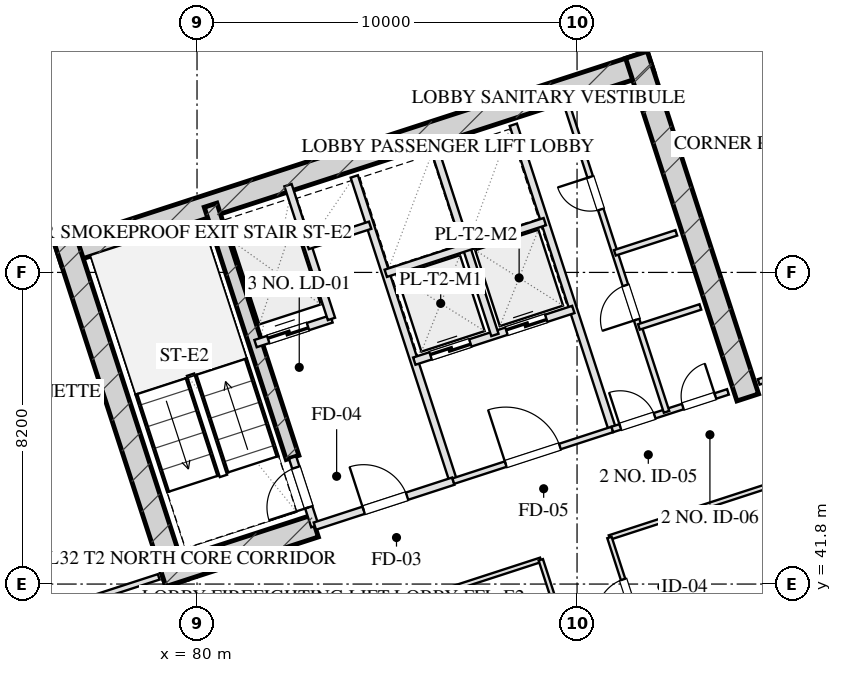
"""IFC4 building model, lengths in metres.
Left out: names, types, materials, properties, quantities, classifications, styles, units other than length and angle.
Written with IfcOpenShell. Run it as: python <this file> out.ifc"""

import sys

from ifc_helpers import new_model, si_unit, direction, frame, frame_2d, origin, place, context, subcontext, project, spatial, rectangle, extrude, element, fill, save


model = new_model("IFC4")
c1 = context("Model", 3, precision=1e-05, world=origin(), true_north=direction((0.0, 1.0)))
c2 = subcontext(c1, "Body", "Model", "MODEL_VIEW")
j1 = project(units=[si_unit("LENGTHUNIT", "METRE"), si_unit("PLANEANGLEUNIT", "RADIAN")], contexts=[c1])
p1 = place(None, origin())
s1 = spatial("IfcSite", under=j1, at=p1, CompositionType="ELEMENT")
p2 = place(p1, origin())
s2 = spatial("IfcBuilding", under=s1, at=p2, CompositionType="ELEMENT")
p3 = place(p2, frame((0.0, 0.0, 124.2)))
s3 = spatial("IfcBuildingStorey", under=s2, at=p3, CompositionType="ELEMENT", Elevation=124.2)
p4 = place(p3, frame((76.344, 50.466, 0.0), z_axis=(0.0, 0.0, 1.0), x_axis=(0.951055727519, 0.309019421968, 0.0)))
e1 = element("IfcWall", 1, at=p4, inside=s3, PredefinedType="SHEAR", context=c2, shape_type="SweptSolid", body=[
    extrude(rectangle(XDim=16.4, YDim=0.6, at=frame_2d((8.2, 0.0))), origin(), (0.0, 0.0, 1.0), 3.45),
])
for number, where, z_axis, x_axis in (
    (2, (79.466, 41.828, 0.0), (0.0, 0.0, 1.0), (-0.309, 0.951, 0.0)),
    (3, (94.492, 46.71, 0.0), (0.0, 0.0, 1.0), (-0.309, 0.951, 0.0)),
):
    element("IfcWall", number, at=place(p3, frame(where, z_axis=z_axis, x_axis=x_axis)), inside=s3, PredefinedType="SHEAR", context=c2, shape_type="SweptSolid", body=[
        extrude(rectangle(XDim=9.48, YDim=0.6, at=frame_2d((4.74, 0.0))), origin(), (0.0, 0.0, 1.0), 3.45),
    ])
p5 = place(p3, frame((82.514, 45.131, 0.0), z_axis=(0.0, 0.0, 1.0), x_axis=(-0.308988790936, 0.951065679686, 0.0)))
e4 = element("IfcWall", 4, at=p5, inside=s3, PredefinedType="SHEAR", context=c2, shape_type="SweptSolid", body=[
    extrude(rectangle(XDim=6.98, YDim=0.35, at=frame_2d((3.49, 0.0))), origin(), (0.0, 0.0, 1.0), 3.45),
])
p6 = place(p3, frame((79.087, 42.021, 0.0), z_axis=(0.0, 0.0, 1.0), x_axis=(0.951062550203, 0.3089984233, 0.0)))
e5 = element("IfcWall", 5, at=p6, inside=s3, PredefinedType="SHEAR", context=c2, shape_type="SweptSolid", body=[
    extrude(rectangle(XDim=4.22, YDim=0.6, at=frame_2d((2.11, 0.0))), origin(), (0.0, 0.0, 1.0), 3.45),
])
p7 = place(p3, frame((80.716, 6.59, 0.0), z_axis=(0.0, 0.0, 1.0), x_axis=(-0.309017542002, 0.95105633836, 0.0)))
e6 = element("IfcWall", 6, at=p7, inside=s3, PredefinedType="SOLIDWALL", context=c2, shape_type="SweptSolid", body=[
    extrude(rectangle(XDim=46.4, YDim=0.4, at=frame_2d((23.2, 0.0))), origin(), (0.0, 0.0, 1.0), 2.61),
])
p8 = place(p7, frame((28.4, 0.0, 0.75)))
e7 = element("IfcOpeningElement", 7, at=p8, cuts=e6, PredefinedType="OPENING", context=c2, shape_type="SweptSolid", body=[
    extrude(rectangle(XDim=2.4, YDim=1.46, at=frame_2d((1.2, 0.73))), frame((0.0, 0.21, 0.0), z_axis=(0.0, -1.0, 0.0), x_axis=(1.0, 0.0, 0.0)), (0.0, 0.0, 1.0), 0.42),
])
p9 = place(p7, frame((18.25, 0.0, 0.0)))
e8 = element("IfcOpeningElement", 8, at=p9, cuts=e6, PredefinedType="OPENING", context=c2, shape_type="SweptSolid", body=[
    extrude(rectangle(XDim=1.1, YDim=2.15, at=frame_2d((0.55, 1.075))), frame((0.0, 0.21, 0.0), z_axis=(0.0, -1.0, 0.0), x_axis=(1.0, 0.0, 0.0)), (0.0, 0.0, 1.0), 0.42),
])
p10 = place(p3, frame((68.047, 53.995, 0.0), z_axis=(0.0, 0.0, 1.0), x_axis=(0.95105505922, 0.309021478754, 0.0)))
e9 = element("IfcWall", 9, at=p10, inside=s3, PredefinedType="SOLIDWALL", context=c2, shape_type="SweptSolid", body=[
    extrude(rectangle(XDim=29.4, YDim=0.4, at=frame_2d((14.7, 0.0))), origin(), (0.0, 0.0, 1.0), 2.61),
])
p11 = place(p3, frame((83.101, 43.324, 0.0), z_axis=(0.0, 0.0, 1.0), x_axis=(-0.309048298632, 0.951046344356, 0.0)))
e10 = element("IfcWall", 10, at=p11, inside=s3, PredefinedType="PARTITIONING", context=c2, shape_type="SweptSolid", body=[
    extrude(rectangle(XDim=1.9, YDim=0.2, at=frame_2d((0.95, 0.0))), origin(), (0.0, 0.0, 1.0), 3.175),
])
p12 = place(p11, frame((0.52, 0.0, 0.0)))
e11 = element("IfcOpeningElement", 11, at=p12, cuts=e10, PredefinedType="OPENING", context=c2, shape_type="SweptSolid", body=[
    extrude(rectangle(XDim=1.1, YDim=2.05, at=frame_2d((0.55, 1.025))), frame((0.0, 0.11, 0.0), z_axis=(0.0, -1.0, 0.0), x_axis=(1.0, 0.0, 0.0)), (0.0, 0.0, 1.0), 0.22),
])
p13 = place(p3, frame((86.743, 44.508, 0.0), z_axis=(0.0, 0.0, 1.0), x_axis=(-0.309016001439, 0.951056838919, 0.0)))
e12 = element("IfcWall", 12, at=p13, inside=s3, PredefinedType="PARTITIONING", context=c2, shape_type="SweptSolid", body=[
    extrude(rectangle(XDim=8.43, YDim=0.2, at=frame_2d((4.215, 0.0))), origin(), (0.0, 0.0, 1.0), 3.175),
])
p14 = place(p3, frame((83.101, 43.324, 0.0), z_axis=(0.0, 0.0, 1.0), x_axis=(0.951052804469, 0.309028417967, 0.0)))
e13 = element("IfcWall", 13, at=p14, inside=s3, PredefinedType="PARTITIONING", context=c2, shape_type="SweptSolid", body=[
    extrude(rectangle(XDim=3.83, YDim=0.2, at=frame_2d((1.915, 0.0))), origin(), (0.0, 0.0, 1.0), 3.175),
])
p15 = place(p14, frame((1.35, 0.0, 0.0)))
e14 = element("IfcOpeningElement", 14, at=p15, cuts=e13, PredefinedType="OPENING", context=c2, shape_type="SweptSolid", body=[
    extrude(rectangle(XDim=1.2, YDim=2.05, at=frame_2d((0.6, 1.025))), frame((0.0, 0.11, 0.0), z_axis=(0.0, -1.0, 0.0), x_axis=(1.0, 0.0, 0.0)), (0.0, 0.0, 1.0), 0.22),
])
p16 = place(p3, frame((81.54, 48.127, 0.0), z_axis=(0.0, 0.0, 1.0), x_axis=(0.951062257173, 0.308999325213, 0.0)))
e15 = element("IfcWall", 15, at=p16, inside=s3, PredefinedType="PARTITIONING", context=c2, shape_type="SweptSolid", body=[
    extrude(rectangle(XDim=2.1, YDim=0.2, at=frame_2d((1.05, 0.0))), origin(), (0.0, 0.0, 1.0), 3.175),
])
p17 = place(p16, frame((0.35, 0.0, 0.0)))
e16 = element("IfcOpeningElement", 16, at=p17, cuts=e15, PredefinedType="OPENING", context=c2, shape_type="SweptSolid", body=[
    extrude(rectangle(XDim=1.1, YDim=2.05, at=frame_2d((0.55, 1.025))), frame((0.0, 0.11, 0.0), z_axis=(0.0, -1.0, 0.0), x_axis=(1.0, 0.0, 0.0)), (0.0, 0.0, 1.0), 0.22),
])
p18 = place(p3, frame((83.538, 48.776, 0.0), z_axis=(0.0, 0.0, 1.0), x_axis=(-0.3089935693, 0.951064127245, 0.0)))
e17 = element("IfcWall", 17, at=p18, inside=s3, PredefinedType="PARTITIONING", context=c2, shape_type="SweptSolid", body=[
    extrude(rectangle(XDim=3.7, YDim=0.2, at=frame_2d((1.85, 0.0))), origin(), (0.0, 0.0, 1.0), 3.175),
])
p19 = place(p3, frame((82.91, 50.707, 0.0), z_axis=(0.0, 0.0, 1.0), x_axis=(0.951041328149, 0.309063734775, 0.0)))
e18 = element("IfcWall", 18, at=p19, inside=s3, PredefinedType="PARTITIONING", context=c2, shape_type="SweptSolid", body=[
    extrude(rectangle(XDim=1.73, YDim=0.2, at=frame_2d((0.865, 0.0))), origin(), (0.0, 0.0, 1.0), 3.175),
])
p20 = place(p3, frame((90.928, 45.868, 0.0), z_axis=(0.0, 0.0, 1.0), x_axis=(-0.309042196757, 0.951048327176, 0.0)))
e19 = element("IfcWall", 19, at=p20, inside=s3, PredefinedType="PARTITIONING", context=c2, shape_type="SweptSolid", body=[
    extrude(rectangle(XDim=8.43, YDim=0.2, at=frame_2d((4.215, 0.0))), origin(), (0.0, 0.0, 1.0), 3.175),
])
p21 = place(p3, frame((86.743, 44.508, 0.0), z_axis=(0.0, 0.0, 1.0), x_axis=(0.951063829732, 0.308994485023, 0.0)))
e20 = element("IfcWall", 20, at=p21, inside=s3, PredefinedType="PARTITIONING", context=c2, shape_type="SweptSolid", body=[
    extrude(rectangle(XDim=4.4, YDim=0.15, at=frame_2d((2.2, 0.0))), origin(), (0.0, 0.0, 1.0), 3.175),
])
p22 = place(p21, frame((1.45, 0.0, 0.0)))
e21 = element("IfcOpeningElement", 21, at=p22, cuts=e20, PredefinedType="OPENING", context=c2, shape_type="SweptSolid", body=[
    extrude(rectangle(XDim=1.5, YDim=2.05, at=frame_2d((0.75, 1.025))), frame((0.0, 0.085, 0.0), z_axis=(0.0, -1.0, 0.0), x_axis=(1.0, 0.0, 0.0)), (0.0, 0.0, 1.0), 0.17),
])
p23 = place(p3, frame((85.718, 47.666, 0.0), z_axis=(0.0, 0.0, 1.0), x_axis=(0.951058531764, 0.30901079133, 0.0)))
e22 = element("IfcWall", 22, at=p23, inside=s3, PredefinedType="PARTITIONING", context=c2, shape_type="SweptSolid", body=[
    extrude(rectangle(XDim=4.4, YDim=0.2, at=frame_2d((2.2, 0.0))), origin(), (0.0, 0.0, 1.0), 3.175),
])
p24 = place(p23, frame((0.45, 0.0, 0.0)))
e23 = element("IfcOpeningElement", 23, at=p24, cuts=e22, PredefinedType="OPENING", context=c2, shape_type="SweptSolid", body=[
    extrude(rectangle(XDim=1.1, YDim=2.05, at=frame_2d((0.55, 1.025))), frame((0.0, 0.11, 0.0), z_axis=(0.0, -1.0, 0.0), x_axis=(1.0, 0.0, 0.0)), (0.0, 0.0, 1.0), 0.22),
])
p25 = place(p23, frame((2.55, 0.0, 0.0)))
e24 = element("IfcOpeningElement", 24, at=p25, cuts=e22, PredefinedType="OPENING", context=c2, shape_type="SweptSolid", body=[
    extrude(rectangle(XDim=1.1, YDim=2.05, at=frame_2d((0.55, 1.025))), frame((0.0, 0.11, 0.0), z_axis=(0.0, -1.0, 0.0), x_axis=(1.0, 0.0, 0.0)), (0.0, 0.0, 1.0), 0.22),
])
p26 = place(p3, frame((87.838, 48.354, 0.0), z_axis=(0.0, 0.0, 1.0), x_axis=(-0.3090093719, 0.951058992953, 0.0)))
e25 = element("IfcWall", 25, at=p26, inside=s3, PredefinedType="PARTITIONING", context=c2, shape_type="SweptSolid", body=[
    extrude(rectangle(XDim=5.11, YDim=0.2, at=frame_2d((2.555, 0.0))), origin(), (0.0, 0.0, 1.0), 3.175),
])
p27 = place(p3, frame((84.967, 49.977, 0.0), z_axis=(0.0, 0.0, 1.0), x_axis=(0.951063829732, 0.308994485023, 0.0)))
e26 = element("IfcWall", 26, at=p27, inside=s3, PredefinedType="PARTITIONING", context=c2, shape_type="SweptSolid", body=[
    extrude(rectangle(XDim=4.4, YDim=0.2, at=frame_2d((2.2, 0.0))), origin(), (0.0, 0.0, 1.0), 3.175),
])
p28 = place(p3, frame((90.928, 45.868, 0.0), z_axis=(0.0, 0.0, 1.0), x_axis=(0.951059297078, 0.309008435874, 0.0)))
e27 = element("IfcWall", 27, at=p28, inside=s3, PredefinedType="PARTITIONING", context=c2, shape_type="SweptSolid", body=[
    extrude(rectangle(XDim=3.2, YDim=0.15, at=frame_2d((1.6, 0.0))), origin(), (0.0, 0.0, 1.0), 3.175),
])
p29 = place(p28, frame((0.22, 0.0, 0.0)))
e28 = element("IfcOpeningElement", 28, at=p29, cuts=e27, PredefinedType="OPENING", context=c2, shape_type="SweptSolid", body=[
    extrude(rectangle(XDim=0.95, YDim=2.05, at=frame_2d((0.475, 1.025))), frame((0.0, 0.085, 0.0), z_axis=(0.0, -1.0, 0.0), x_axis=(1.0, 0.0, 0.0)), (0.0, 0.0, 1.0), 0.17),
])
p30 = place(p28, frame((1.95, 0.0, 0.0)))
e29 = element("IfcOpeningElement", 29, at=p30, cuts=e27, PredefinedType="OPENING", context=c2, shape_type="SweptSolid", body=[
    extrude(rectangle(XDim=0.9, YDim=2.05, at=frame_2d((0.45, 1.025))), frame((0.0, 0.085, 0.0), z_axis=(0.0, -1.0, 0.0), x_axis=(1.0, 0.0, 0.0)), (0.0, 0.0, 1.0), 0.17),
])
p31 = place(p3, frame((92.355, 46.331, 0.0), z_axis=(0.0, 0.0, 1.0), x_axis=(-0.309007490203, 0.951059604335, 0.0)))
e30 = element("IfcWall", 30, at=p31, inside=s3, PredefinedType="PARTITIONING", context=c2, shape_type="SweptSolid", body=[
    extrude(rectangle(XDim=8.43, YDim=0.15, at=frame_2d((4.215, 0.0))), origin(), (0.0, 0.0, 1.0), 3.175),
])
p32 = place(p31, frame((2.55, 0.0, 0.0)))
e31 = element("IfcOpeningElement", 31, at=p32, cuts=e30, PredefinedType="OPENING", context=c2, shape_type="SweptSolid", body=[
    extrude(rectangle(XDim=0.95, YDim=2.05, at=frame_2d((0.475, 1.025))), frame((0.0, 0.085, 0.0), z_axis=(0.0, -1.0, 0.0), x_axis=(1.0, 0.0, 0.0)), (0.0, 0.0, 1.0), 0.17),
])
p33 = place(p31, frame((5.6, 0.0, 0.0)))
e32 = element("IfcOpeningElement", 32, at=p33, cuts=e30, PredefinedType="OPENING", context=c2, shape_type="SweptSolid", body=[
    extrude(rectangle(XDim=0.9, YDim=2.05, at=frame_2d((0.45, 1.025))), frame((0.0, 0.085, 0.0), z_axis=(0.0, -1.0, 0.0), x_axis=(1.0, 0.0, 0.0)), (0.0, 0.0, 1.0), 0.17),
])
p34 = place(p3, frame((90.995, 50.516, 0.0), z_axis=(0.0, 0.0, 1.0), x_axis=(0.951040401051, 0.309066587596, 0.0)))
e33 = element("IfcWall", 33, at=p34, inside=s3, PredefinedType="PARTITIONING", context=c2, shape_type="SweptSolid", body=[
    extrude(rectangle(XDim=1.7, YDim=0.15, at=frame_2d((0.85, 0.0))), origin(), (0.0, 0.0, 1.0), 3.175),
])
p35 = place(p3, frame((91.628, 48.566, 0.0), z_axis=(0.0, 0.0, 1.0), x_axis=(0.951054116971, 0.309024378638, 0.0)))
e34 = element("IfcWall", 34, at=p35, inside=s3, PredefinedType="PARTITIONING", context=c2, shape_type="SweptSolid", body=[
    extrude(rectangle(XDim=1.7, YDim=0.15, at=frame_2d((0.85, 0.0))), origin(), (0.0, 0.0, 1.0), 3.175),
])
p36 = place(p3, frame((70.338, 39.177, 0.0), z_axis=(0.0, 0.0, 1.0), x_axis=(0.951059695568, 0.309007209409, 0.0)))
e35 = element("IfcWall", 35, at=p36, inside=s3, PredefinedType="PARTITIONING", context=c2, shape_type="SweptSolid", body=[
    extrude(rectangle(XDim=9.1, YDim=0.15, at=frame_2d((4.55, 0.0))), origin(), (0.0, 0.0, 1.0), 3.175),
])
p37 = place(p36, frame((3.822, 0.0, 0.0)))
e36 = element("IfcOpeningElement", 36, at=p37, cuts=e35, PredefinedType="OPENING", context=c2, shape_type="SweptSolid", body=[
    extrude(rectangle(XDim=1.0, YDim=2.05, at=frame_2d((0.5, 1.025))), frame((0.0, 0.085, 0.0), z_axis=(0.0, -1.0, 0.0), x_axis=(1.0, 0.0, 0.0)), (0.0, 0.0, 1.0), 0.17),
])
p38 = place(p3, frame((94.78, 47.119, 0.0), z_axis=(0.0, 0.0, 1.0), x_axis=(0.951054329824, 0.309023723562, 0.0)))
e37 = element("IfcWall", 37, at=p38, inside=s3, PredefinedType="PARTITIONING", context=c2, shape_type="SweptSolid", body=[
    extrude(rectangle(XDim=8.5, YDim=0.15, at=frame_2d((4.25, 0.0))), origin(), (0.0, 0.0, 1.0), 3.175),
])
p39 = place(p38, frame((3.57, 0.0, 0.0)))
e38 = element("IfcOpeningElement", 38, at=p39, cuts=e37, PredefinedType="OPENING", context=c2, shape_type="SweptSolid", body=[
    extrude(rectangle(XDim=1.0, YDim=2.05, at=frame_2d((0.5, 1.025))), frame((0.0, 0.085, 0.0), z_axis=(0.0, -1.0, 0.0), x_axis=(1.0, 0.0, 0.0)), (0.0, 0.0, 1.0), 0.17),
])
p40 = place(p3, frame((81.532, 39.997, 0.0), z_axis=(0.0, 0.0, 1.0), x_axis=(0.951048148493, 0.309042746635, 0.0)))
e39 = element("IfcWall", 39, at=p40, inside=s3, PredefinedType="PARTITIONING", context=c2, shape_type="SweptSolid", body=[
    extrude(rectangle(XDim=7.9, YDim=0.12, at=frame_2d((3.95, 0.0))), origin(), (0.0, 0.0, 1.0), 3.175),
])
p41 = place(p3, frame((90.853, 43.025, 0.0), z_axis=(0.0, 0.0, 1.0), x_axis=(0.951054001411, 0.309024734286, 0.0)))
e40 = element("IfcWall", 40, at=p41, inside=s3, PredefinedType="PARTITIONING", context=c2, shape_type="SweptSolid", body=[
    extrude(rectangle(XDim=13.5, YDim=0.12, at=frame_2d((6.75, 0.0))), origin(), (0.0, 0.0, 1.0), 3.175),
])
p42 = place(p3, frame((94.188, 26.613, 0.0), z_axis=(0.0, 0.0, 1.0), x_axis=(-0.30901773025, 0.951056277195, 0.0)))
e41 = element("IfcWall", 41, at=p42, inside=s3, PredefinedType="PARTITIONING", context=c2, shape_type="SweptSolid", body=[
    extrude(rectangle(XDim=16.64, YDim=0.12, at=frame_2d((8.32, 0.0))), origin(), (0.0, 0.0, 1.0), 3.175),
])
p43 = place(p42, frame((9.304, 0.0, 0.0)))
e42 = element("IfcOpeningElement", 42, at=p43, cuts=e41, PredefinedType="OPENING", context=c2, shape_type="SweptSolid", body=[
    extrude(rectangle(XDim=1.1, YDim=2.05, at=frame_2d((0.55, 1.025))), frame((0.0, 0.07, 0.0), z_axis=(0.0, -1.0, 0.0), x_axis=(1.0, 0.0, 0.0)), (0.0, 0.0, 1.0), 0.14),
])
p44 = place(p3, frame((95.995, 27.2, 0.0), z_axis=(0.0, 0.0, 1.0), x_axis=(-0.309022042254, 0.951054876125, 0.0)))
e43 = element("IfcWall", 43, at=p44, inside=s3, PredefinedType="PARTITIONING", context=c2, shape_type="SweptSolid", body=[
    extrude(rectangle(XDim=16.64, YDim=0.12, at=frame_2d((8.32, 0.0))), origin(), (0.0, 0.0, 1.0), 3.175),
])
p45 = place(p44, frame((1.16, 0.0, 0.0)))
e44 = element("IfcOpeningElement", 44, at=p45, cuts=e43, PredefinedType="OPENING", context=c2, shape_type="SweptSolid", body=[
    extrude(rectangle(XDim=0.85, YDim=2.05, at=frame_2d((0.425, 1.025))), frame((0.0, 0.07, 0.0), z_axis=(0.0, -1.0, 0.0), x_axis=(1.0, 0.0, 0.0)), (0.0, 0.0, 1.0), 0.14),
])
p46 = place(p44, frame((5.48, 0.0, 0.0)))
e45 = element("IfcOpeningElement", 45, at=p46, cuts=e43, PredefinedType="OPENING", context=c2, shape_type="SweptSolid", body=[
    extrude(rectangle(XDim=1.0, YDim=2.05, at=frame_2d((0.5, 1.025))), frame((0.0, 0.07, 0.0), z_axis=(0.0, -1.0, 0.0), x_axis=(1.0, 0.0, 0.0)), (0.0, 0.0, 1.0), 0.14),
])
p47 = place(p44, frame((9.48, 0.0, 0.0)))
e46 = element("IfcOpeningElement", 46, at=p47, cuts=e43, PredefinedType="OPENING", context=c2, shape_type="SweptSolid", body=[
    extrude(rectangle(XDim=1.0, YDim=2.05, at=frame_2d((0.5, 1.025))), frame((0.0, 0.07, 0.0), z_axis=(0.0, -1.0, 0.0), x_axis=(1.0, 0.0, 0.0)), (0.0, 0.0, 1.0), 0.14),
])
p48 = place(p44, frame((14.48, 0.0, 0.0)))
e47 = element("IfcOpeningElement", 47, at=p48, cuts=e43, PredefinedType="OPENING", context=c2, shape_type="SweptSolid", body=[
    extrude(rectangle(XDim=1.0, YDim=2.05, at=frame_2d((0.5, 1.025))), frame((0.0, 0.07, 0.0), z_axis=(0.0, -1.0, 0.0), x_axis=(1.0, 0.0, 0.0)), (0.0, 0.0, 1.0), 0.14),
])
p49 = place(p3, frame((91.879, 39.868, 0.0), z_axis=(0.0, 0.0, 1.0), x_axis=(0.951054001411, 0.309024734286, 0.0)))
e48 = element("IfcWall", 48, at=p49, inside=s3, PredefinedType="PARTITIONING", context=c2, shape_type="SweptSolid", body=[
    extrude(rectangle(XDim=13.5, YDim=0.12, at=frame_2d((6.75, 0.0))), origin(), (0.0, 0.0, 1.0), 3.175),
])
p50 = place(p12, origin())
e49 = element("IfcDoor", 49, at=p50, inside=s3, OperationType="SINGLE_SWING_LEFT", PredefinedType="DOOR", context=c2, shape_type="SweptSolid", body=[
    extrude(rectangle(XDim=1.1, YDim=2.05, at=frame_2d((0.55, 1.025))), frame((0.0, 0.025, 0.0), z_axis=(0.0, -1.0, 0.0), x_axis=(1.0, 0.0, 0.0)), (0.0, 0.0, 1.0), 0.05),
])
fill(e11, e49)
p51 = place(p15, origin())
e50 = element("IfcDoor", 50, at=p51, inside=s3, OperationType="SINGLE_SWING_LEFT", PredefinedType="DOOR", context=c2, shape_type="SweptSolid", body=[
    extrude(rectangle(XDim=1.2, YDim=2.05, at=frame_2d((0.6, 1.025))), frame((0.0, 0.025, 0.0), z_axis=(0.0, -1.0, 0.0), x_axis=(1.0, 0.0, 0.0)), (0.0, 0.0, 1.0), 0.05),
])
fill(e14, e50)
p52 = place(p17, origin())
e51 = element("IfcDoor", 51, at=p52, inside=s3, OperationType="DOUBLE_DOOR_SLIDING", PredefinedType="DOOR", context=c2, shape_type="SweptSolid", body=[
    extrude(rectangle(XDim=1.1, YDim=2.05, at=frame_2d((0.55, 1.025))), frame((0.0, 0.025, 0.0), z_axis=(0.0, -1.0, 0.0), x_axis=(1.0, 0.0, 0.0)), (0.0, 0.0, 1.0), 0.05),
])
fill(e16, e51)
p53 = place(p22, origin())
e52 = element("IfcDoor", 52, at=p53, inside=s3, OperationType="SINGLE_SWING_LEFT", PredefinedType="DOOR", context=c2, shape_type="SweptSolid", body=[
    extrude(rectangle(XDim=1.5, YDim=2.05, at=frame_2d((0.75, 1.025))), frame((0.0, 0.025, 0.0), z_axis=(0.0, -1.0, 0.0), x_axis=(1.0, 0.0, 0.0)), (0.0, 0.0, 1.0), 0.05),
])
fill(e21, e52)
p54 = place(p24, origin())
e53 = element("IfcDoor", 53, at=p54, inside=s3, OperationType="DOUBLE_DOOR_SLIDING", PredefinedType="DOOR", context=c2, shape_type="SweptSolid", body=[
    extrude(rectangle(XDim=1.1, YDim=2.05, at=frame_2d((0.55, 1.025))), frame((0.0, 0.025, 0.0), z_axis=(0.0, -1.0, 0.0), x_axis=(1.0, 0.0, 0.0)), (0.0, 0.0, 1.0), 0.05),
])
fill(e23, e53)
p55 = place(p25, origin())
e54 = element("IfcDoor", 54, at=p55, inside=s3, OperationType="DOUBLE_DOOR_SLIDING", PredefinedType="DOOR", context=c2, shape_type="SweptSolid", body=[
    extrude(rectangle(XDim=1.1, YDim=2.05, at=frame_2d((0.55, 1.025))), frame((0.0, 0.025, 0.0), z_axis=(0.0, -1.0, 0.0), x_axis=(1.0, 0.0, 0.0)), (0.0, 0.0, 1.0), 0.05),
])
fill(e24, e54)
p56 = place(p29, origin())
e55 = element("IfcDoor", 55, at=p56, inside=s3, OperationType="SINGLE_SWING_LEFT", PredefinedType="DOOR", context=c2, shape_type="SweptSolid", body=[
    extrude(rectangle(XDim=0.95, YDim=2.05, at=frame_2d((0.475, 1.025))), frame((0.0, 0.025, 0.0), z_axis=(0.0, -1.0, 0.0), x_axis=(1.0, 0.0, 0.0)), (0.0, 0.0, 1.0), 0.05),
])
fill(e28, e55)
p57 = place(p30, origin())
e56 = element("IfcDoor", 56, at=p57, inside=s3, OperationType="SINGLE_SWING_RIGHT", PredefinedType="DOOR", context=c2, shape_type="SweptSolid", body=[
    extrude(rectangle(XDim=0.9, YDim=2.05, at=frame_2d((0.45, 1.025))), frame((0.0, 0.025, 0.0), z_axis=(0.0, -1.0, 0.0), x_axis=(1.0, 0.0, 0.0)), (0.0, 0.0, 1.0), 0.05),
])
fill(e29, e56)
p58 = place(p32, origin())
e57 = element("IfcDoor", 57, at=p58, inside=s3, OperationType="SINGLE_SWING_LEFT", PredefinedType="DOOR", context=c2, shape_type="SweptSolid", body=[
    extrude(rectangle(XDim=0.95, YDim=2.05, at=frame_2d((0.475, 1.025))), frame((0.0, 0.025, 0.0), z_axis=(0.0, -1.0, 0.0), x_axis=(1.0, 0.0, 0.0)), (0.0, 0.0, 1.0), 0.05),
])
fill(e31, e57)
p59 = place(p33, origin())
e58 = element("IfcDoor", 58, at=p59, inside=s3, OperationType="SINGLE_SWING_RIGHT", PredefinedType="DOOR", context=c2, shape_type="SweptSolid", body=[
    extrude(rectangle(XDim=0.9, YDim=2.05, at=frame_2d((0.45, 1.025))), frame((0.0, 0.025, 0.0), z_axis=(0.0, -1.0, 0.0), x_axis=(1.0, 0.0, 0.0)), (0.0, 0.0, 1.0), 0.05),
])
fill(e32, e58)
p60 = place(p48, origin())
e59 = element("IfcDoor", 59, at=p60, inside=s3, OperationType="SINGLE_SWING_LEFT", PredefinedType="DOOR", context=c2, shape_type="SweptSolid", body=[
    extrude(rectangle(XDim=1.0, YDim=2.05, at=frame_2d((0.5, 1.025))), frame((0.0, 0.025, 0.0), z_axis=(0.0, -1.0, 0.0), x_axis=(1.0, 0.0, 0.0)), (0.0, 0.0, 1.0), 0.05),
])
fill(e47, e59)
save(model, sys.argv[1])
